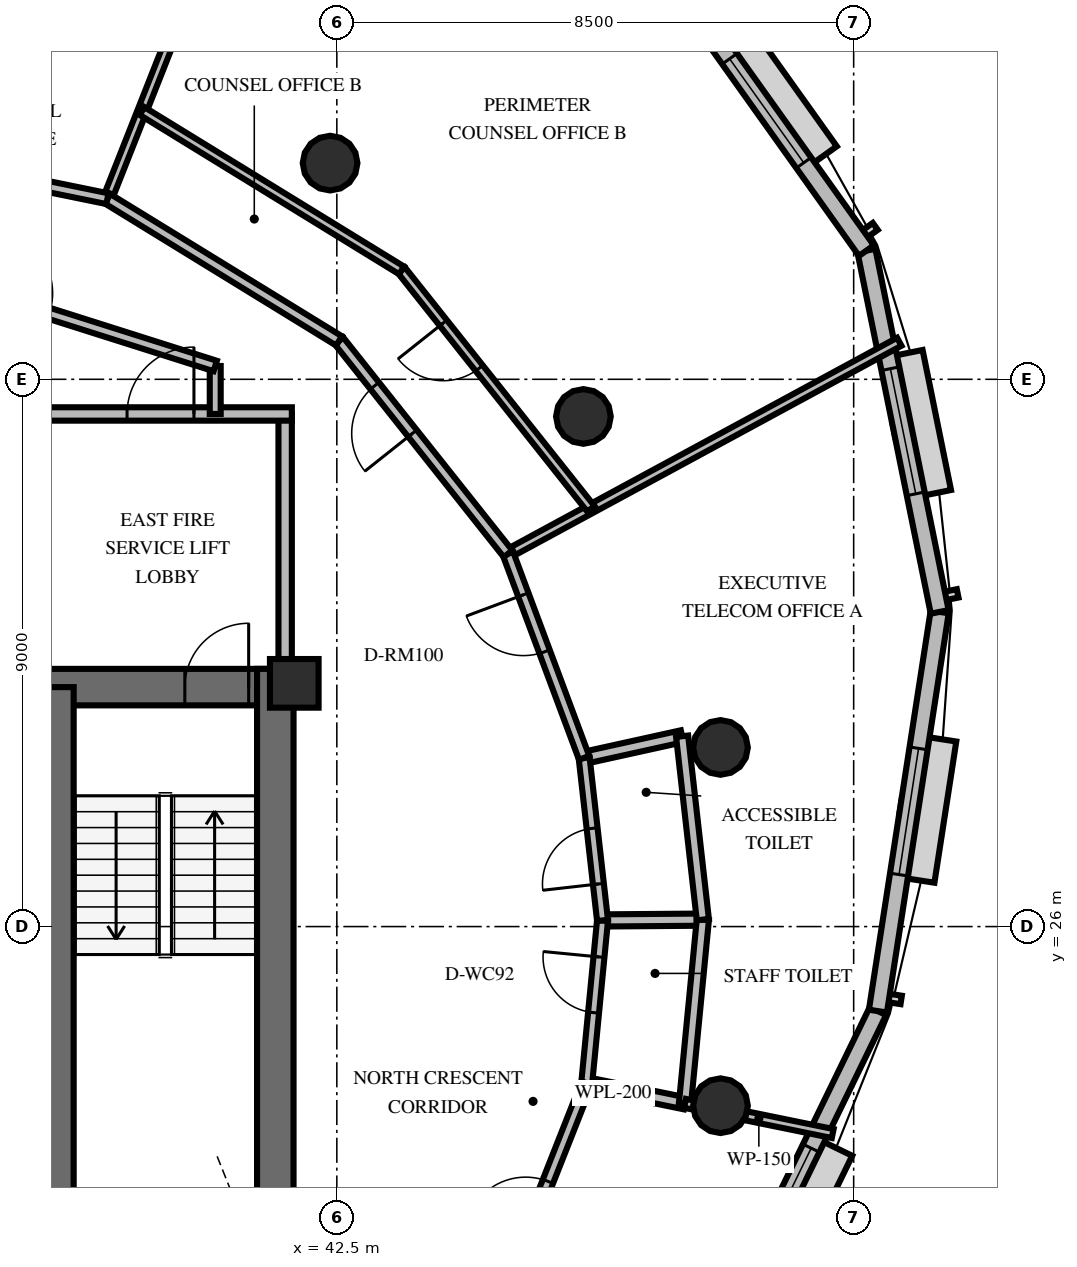
"""IFC4 building model, lengths in metres.
Left out: names, types, materials, properties, quantities, classifications, styles, units other than length and angle.
Written with IfcOpenShell. Run it as: python <this file> out.ifc"""

import sys

from ifc_helpers import new_model, si_unit, direction, frame, frame_2d, origin, origin_2d, place, context, subcontext, project, spatial, rectangle, circle, extrude, element, fill, save


model = new_model("IFC4")
c1 = context("Model", 3, precision=1e-05, world=origin(), true_north=direction((0.0, 1.0)))
c2 = subcontext(c1, "Body", "Model", "MODEL_VIEW")
j1 = project(units=[si_unit("LENGTHUNIT", "METRE"), si_unit("PLANEANGLEUNIT", "RADIAN")], contexts=[c1])
p1 = place(None, origin())
s1 = spatial("IfcSite", under=j1, at=p1, CompositionType="ELEMENT")
p2 = place(p1, origin())
s2 = spatial("IfcBuilding", under=s1, at=p2, CompositionType="ELEMENT")
p3 = place(p2, frame((0.0, 0.0, 234.0)))
s3 = spatial("IfcBuildingStorey", under=s2, at=p3, CompositionType="ELEMENT", Elevation=234.0)
p4 = place(p3, frame((26.222, 29.938, 0.0), z_axis=(0.0, 0.0, 1.0), x_axis=(1.0, 0.0, 0.0)))
e1 = element("IfcWall", 1, at=p4, inside=s3, PredefinedType="SHEAR", context=c2, shape_type="SweptSolid", body=[
    extrude(rectangle(XDim=15.566, YDim=0.6, at=frame_2d((7.783, 0.0))), origin(), (0.0, 0.0, 1.0), 3.6),
])
p5 = place(p4, frame((0.728, 0.0, 0.0)))
e2 = element("IfcOpeningElement", 2, at=p5, cuts=e1, PredefinedType="OPENING", context=c2, shape_type="SweptSolid", body=[
    extrude(rectangle(XDim=1.05, YDim=2.15, at=frame_2d((0.525, 1.075))), frame((0.0, 0.31, 0.0), z_axis=(0.0, -1.0, 0.0), x_axis=(1.0, 0.0, 0.0)), (0.0, 0.0, 1.0), 0.62),
])
p6 = place(p4, frame((13.778, 0.0, 0.0)))
e3 = element("IfcOpeningElement", 3, at=p6, cuts=e1, PredefinedType="OPENING", context=c2, shape_type="SweptSolid", body=[
    extrude(rectangle(XDim=1.05, YDim=2.15, at=frame_2d((0.525, 1.075))), frame((0.0, 0.31, 0.0), z_axis=(0.0, -1.0, 0.0), x_axis=(1.0, 0.0, 0.0)), (0.0, 0.0, 1.0), 0.62),
])
p7 = place(p4, frame((7.228, 0.0, 0.0)))
e4 = element("IfcOpeningElement", 4, at=p7, cuts=e1, PredefinedType="OPENING", context=c2, shape_type="SweptSolid", body=[
    extrude(rectangle(XDim=1.1, YDim=2.15, at=frame_2d((0.55, 1.075))), frame((0.0, 0.31, 0.0), z_axis=(0.0, -1.0, 0.0), x_axis=(1.0, 0.0, 0.0)), (0.0, 0.0, 1.0), 0.62),
])
p8 = place(p3, frame((41.488, 19.962, 0.0), z_axis=(0.0, 0.0, 1.0), x_axis=(0.0, 1.0, 0.0)))
e5 = element("IfcWall", 5, at=p8, inside=s3, PredefinedType="SHEAR", context=c2, shape_type="SweptSolid", body=[
    extrude(rectangle(XDim=10.276, YDim=0.6, at=frame_2d((5.138, 0.0))), origin(), (0.0, 0.0, 1.0), 3.6),
])
p9 = place(p3, frame((37.922, 20.262, 0.0), z_axis=(0.0, 0.0, 1.0), x_axis=(0.0, 1.0, 0.0)))
e6 = element("IfcWall", 6, at=p9, inside=s3, PredefinedType="SHEAR", context=c2, shape_type="SweptSolid", body=[
    extrude(rectangle(XDim=9.676, YDim=0.5, at=frame_2d((4.838, 0.0))), origin(), (0.0, 0.0, 1.0), 3.6),
])
p10 = place(p3, frame((41.8, 30.0, 0.0), z_axis=(0.0, 0.0, 1.0), x_axis=(1.0, 0.0, 0.0)))
e7 = element("IfcColumn", 7, at=p10, inside=s3, PredefinedType="PILASTER", context=c2, shape_type="SweptSolid", body=[
    extrude(rectangle(XDim=0.8, YDim=0.8, at=origin_2d()), origin(), (0.0, 0.0, 1.0), 3.6),
])
for number, where, z_axis, x_axis in (
    (8, (48.81, 28.946, 0.0), (0.0, 0.0, 1.0), (1.0, 0.0, 0.0)),
    (9, (46.555, 34.389, 0.0), (0.0, 0.0, 1.0), (1.0, 0.0, 0.0)),
    (10, (42.389, 38.555, 0.0), (0.0, 0.0, 1.0), (1.0, 0.0, 0.0)),
    (11, (48.81, 23.054, 0.0), (0.0, 0.0, 1.0), (1.0, 0.0, 0.0)),
):
    element("IfcColumn", number, at=place(p3, frame(where, z_axis=z_axis, x_axis=x_axis)), inside=s3, PredefinedType="COLUMN", context=c2, shape_type="SweptSolid", body=[
        extrude(circle(Radius=0.45, at=origin_2d()), origin(), (0.0, 0.0, 1.0), 3.6),
    ])
p11 = place(p3, frame((48.284, 18.213, 0.0), z_axis=(0.0, 0.0, 1.0), x_axis=(0.437731914834, 0.899105539264, 0.0)))
e12 = element("IfcWall", 12, at=p11, inside=s3, PredefinedType="SOLIDWALL", context=c2, shape_type="SweptSolid", body=[
    extrude(rectangle(XDim=7.115, YDim=0.3, at=frame_2d((3.558, 0.0))), origin(), (0.0, 0.0, 1.0), 2.76),
])
p12 = place(p11, frame((2.508, 0.0, 0.8)))
e13 = element("IfcOpeningElement", 13, at=p12, cuts=e12, PredefinedType="OPENING", context=c2, shape_type="SweptSolid", body=[
    extrude(rectangle(XDim=2.1, YDim=1.85, at=frame_2d((1.05, 0.925))), frame((0.0, 0.16, 0.0), z_axis=(0.0, -1.0, 0.0), x_axis=(1.0, 0.0, 0.0)), (0.0, 0.0, 1.0), 0.32),
])
p13 = place(p3, frame((51.399, 24.61, 0.0), z_axis=(0.0, 0.0, 1.0), x_axis=(0.15291596783, 0.988239195126, 0.0)))
e14 = element("IfcWall", 14, at=p13, inside=s3, PredefinedType="SOLIDWALL", context=c2, shape_type="SweptSolid", body=[
    extrude(rectangle(XDim=6.643, YDim=0.3, at=frame_2d((3.322, 0.0))), origin(), (0.0, 0.0, 1.0), 2.76),
])
p14 = place(p13, frame((2.272, 0.0, 0.8)))
e15 = element("IfcOpeningElement", 15, at=p14, cuts=e14, PredefinedType="OPENING", context=c2, shape_type="SweptSolid", body=[
    extrude(rectangle(XDim=2.1, YDim=1.85, at=frame_2d((1.05, 0.925))), frame((0.0, 0.16, 0.0), z_axis=(0.0, -1.0, 0.0), x_axis=(1.0, 0.0, 0.0)), (0.0, 0.0, 1.0), 0.32),
])
p15 = place(p3, frame((52.415, 31.175, 0.0), z_axis=(0.0, 0.0, 1.0), x_axis=(-0.198803056685, 0.980039460763, 0.0)))
e16 = element("IfcWall", 16, at=p15, inside=s3, PredefinedType="SOLIDWALL", context=c2, shape_type="SweptSolid", body=[
    extrude(rectangle(XDim=6.062, YDim=0.3, at=frame_2d((3.031, 0.0))), origin(), (0.0, 0.0, 1.0), 2.76),
])
p16 = place(p15, frame((1.981, 0.0, 0.8)))
e17 = element("IfcOpeningElement", 17, at=p16, cuts=e16, PredefinedType="OPENING", context=c2, shape_type="SweptSolid", body=[
    extrude(rectangle(XDim=2.1, YDim=1.85, at=frame_2d((1.05, 0.925))), frame((0.0, 0.16, 0.0), z_axis=(0.0, -1.0, 0.0), x_axis=(1.0, 0.0, 0.0)), (0.0, 0.0, 1.0), 0.32),
])
p17 = place(p3, frame((51.21, 37.116, 0.0), z_axis=(0.0, 0.0, 1.0), x_axis=(-0.580678098199, 0.814133248475, 0.0)))
e18 = element("IfcWall", 18, at=p17, inside=s3, PredefinedType="SOLIDWALL", context=c2, shape_type="SweptSolid", body=[
    extrude(rectangle(XDim=5.65, YDim=0.3, at=frame_2d((2.825, 0.0))), origin(), (0.0, 0.0, 1.0), 2.76),
])
p18 = place(p17, frame((1.775, 0.0, 0.8)))
e19 = element("IfcOpeningElement", 19, at=p18, cuts=e18, PredefinedType="OPENING", context=c2, shape_type="SweptSolid", body=[
    extrude(rectangle(XDim=2.1, YDim=1.85, at=frame_2d((1.05, 0.925))), frame((0.0, 0.16, 0.0), z_axis=(0.0, -1.0, 0.0), x_axis=(1.0, 0.0, 0.0)), (0.0, 0.0, 1.0), 0.32),
])
p19 = place(p3, frame((41.65, 30.05, 0.0), z_axis=(0.0, 0.0, 1.0), x_axis=(0.0, 1.0, 0.0)))
e20 = element("IfcWall", 20, at=p19, inside=s3, PredefinedType="SOLIDWALL", context=c2, shape_type="SweptSolid", body=[
    extrude(rectangle(XDim=4.38, YDim=0.22, at=frame_2d((2.19, 0.0))), origin(), (0.0, 0.0, 1.0), 2.46),
])
p20 = place(p3, frame((37.45, 34.43, 0.0), z_axis=(0.0, 0.0, 1.0), x_axis=(1.0, 0.0, 0.0)))
e21 = element("IfcWall", 21, at=p20, inside=s3, PredefinedType="SOLIDWALL", context=c2, shape_type="SweptSolid", body=[
    extrude(rectangle(XDim=4.31, YDim=0.22, at=frame_2d((2.155, 0.0))), origin(), (0.0, 0.0, 1.0), 2.46),
])
p21 = place(p20, frame((1.6, 0.0, 0.0)))
e22 = element("IfcOpeningElement", 22, at=p21, cuts=e21, PredefinedType="OPENING", context=c2, shape_type="SweptSolid", body=[
    extrude(rectangle(XDim=1.1, YDim=2.15, at=frame_2d((0.55, 1.075))), frame((0.0, 0.12, 0.0), z_axis=(0.0, -1.0, 0.0), x_axis=(1.0, 0.0, 0.0)), (0.0, 0.0, 1.0), 0.24),
])
p22 = place(p3, frame((40.5, 35.219, 0.0), z_axis=(0.0, 0.0, 1.0), x_axis=(0.0, -1.0, 0.0)))
e23 = element("IfcWall", 23, at=p22, inside=s3, PredefinedType="PARTITIONING", context=c2, shape_type="SweptSolid", body=[
    extrude(rectangle(XDim=0.789, YDim=0.18, at=frame_2d((0.395, 0.0))), origin(), (0.0, 0.0, 1.0), 2.46),
])
p23 = place(p3, frame((34.0, 37.28, 0.0), z_axis=(0.0, 0.0, 1.0), x_axis=(0.953228121756, -0.302251795518, 0.0)))
e24 = element("IfcWall", 24, at=p23, inside=s3, PredefinedType="PARTITIONING", context=c2, shape_type="SweptSolid", body=[
    extrude(rectangle(XDim=6.819, YDim=0.18, at=frame_2d((3.409, 0.0))), origin(), (0.0, 0.0, 1.0), 2.46),
])
p24 = place(p23, frame((2.86, 0.0, 0.0)))
e25 = element("IfcOpeningElement", 25, at=p24, cuts=e24, PredefinedType="OPENING", context=c2, shape_type="SweptSolid", body=[
    extrude(rectangle(XDim=1.1, YDim=2.15, at=frame_2d((0.55, 1.075))), frame((0.0, 0.1, 0.0), z_axis=(0.0, -1.0, 0.0), x_axis=(1.0, 0.0, 0.0)), (0.0, 0.0, 1.0), 0.2),
])
p25 = place(p3, frame((46.609, 23.423, 0.0), z_axis=(0.0, 0.0, 1.0), x_axis=(0.979758481416, -0.200183211319, 0.0)))
e26 = element("IfcWall", 26, at=p25, inside=s3, PredefinedType="PLUMBINGWALL", context=c2, shape_type="SweptSolid", body=[
    extrude(rectangle(XDim=1.65, YDim=0.2, at=frame_2d((0.825, 0.0))), origin(), (0.0, 0.0, 1.0), 2.46),
])
p26 = place(p3, frame((46.87, 26.101, 0.0), z_axis=(0.0, 0.0, 1.0), x_axis=(0.999969248569, 0.0078423158, 0.0)))
e27 = element("IfcWall", 27, at=p26, inside=s3, PredefinedType="PLUMBINGWALL", context=c2, shape_type="SweptSolid", body=[
    extrude(rectangle(XDim=1.65, YDim=0.2, at=frame_2d((0.825, 0.0))), origin(), (0.0, 0.0, 1.0), 2.46),
])
p27 = place(p3, frame((48.226, 23.093, 0.0), z_axis=(0.0, 0.0, 1.0), x_axis=(0.096676337661, 0.995315872342, 0.0)))
e28 = element("IfcWall", 28, at=p27, inside=s3, PredefinedType="PLUMBINGWALL", context=c2, shape_type="SweptSolid", body=[
    extrude(rectangle(XDim=3.035, YDim=0.2, at=frame_2d((1.518, 0.0))), origin(), (0.0, 0.0, 1.0), 2.46),
])
p28 = place(p3, frame((46.609, 23.423, 0.0), z_axis=(0.0, 0.0, 1.0), x_axis=(0.096727271829, 0.995310923724, 0.0)))
e29 = element("IfcWall", 29, at=p28, inside=s3, PredefinedType="PARTITIONING", context=c2, shape_type="SweptSolid", body=[
    extrude(rectangle(XDim=2.691, YDim=0.18, at=frame_2d((1.345, 0.0))), origin(), (0.0, 0.0, 1.0), 2.46),
])
p29 = place(p28, frame((1.167, 0.0, 0.0)))
e30 = element("IfcOpeningElement", 30, at=p29, cuts=e29, PredefinedType="OPENING", context=c2, shape_type="SweptSolid", body=[
    extrude(rectangle(XDim=0.92, YDim=2.1, at=frame_2d((0.46, 1.05))), frame((0.0, 0.1, 0.0), z_axis=(0.0, -1.0, 0.0), x_axis=(1.0, 0.0, 0.0)), (0.0, 0.0, 1.0), 0.2),
])
p30 = place(p3, frame((46.567, 28.775, 0.0), z_axis=(0.0, 0.0, 1.0), x_axis=(0.976488977009, 0.215567339318, 0.0)))
e31 = element("IfcWall", 31, at=p30, inside=s3, PredefinedType="PLUMBINGWALL", context=c2, shape_type="SweptSolid", body=[
    extrude(rectangle(XDim=1.65, YDim=0.2, at=frame_2d((0.825, 0.0))), origin(), (0.0, 0.0, 1.0), 2.46),
])
p31 = place(p3, frame((48.52, 26.114, 0.0), z_axis=(0.0, 0.0, 1.0), x_axis=(-0.112276255415, 0.993677031268, 0.0)))
e32 = element("IfcWall", 32, at=p31, inside=s3, PredefinedType="PLUMBINGWALL", context=c2, shape_type="SweptSolid", body=[
    extrude(rectangle(XDim=3.036, YDim=0.2, at=frame_2d((1.518, 0.0))), origin(), (0.0, 0.0, 1.0), 2.46),
])
p32 = place(p3, frame((46.87, 26.101, 0.0), z_axis=(0.0, 0.0, 1.0), x_axis=(-0.112333499696, 0.993670561527, 0.0)))
e33 = element("IfcWall", 33, at=p32, inside=s3, PredefinedType="PARTITIONING", context=c2, shape_type="SweptSolid", body=[
    extrude(rectangle(XDim=2.691, YDim=0.18, at=frame_2d((1.345, 0.0))), origin(), (0.0, 0.0, 1.0), 2.46),
])
p33 = place(p32, frame((0.603, 0.0, 0.0)))
e34 = element("IfcOpeningElement", 34, at=p33, cuts=e33, PredefinedType="OPENING", context=c2, shape_type="SweptSolid", body=[
    extrude(rectangle(XDim=0.92, YDim=2.1, at=frame_2d((0.46, 1.05))), frame((0.0, 0.1, 0.0), z_axis=(0.0, -1.0, 0.0), x_axis=(1.0, 0.0, 0.0)), (0.0, 0.0, 1.0), 0.2),
])
p34 = place(p3, frame((48.226, 23.093, 0.0), z_axis=(0.0, 0.0, 1.0), x_axis=(0.979742600156, -0.200260923396, 0.0)))
e35 = element("IfcWall", 35, at=p34, inside=s3, PredefinedType="PARTITIONING", context=c2, shape_type="SweptSolid", body=[
    extrude(rectangle(XDim=2.48, YDim=0.15, at=frame_2d((1.24, 0.0))), origin(), (0.0, 0.0, 1.0), 2.46),
])
p35 = place(p3, frame((45.316, 32.131, 0.0), z_axis=(0.0, 0.0, 1.0), x_axis=(0.879230834662, 0.476395990096, 0.0)))
e36 = element("IfcWall", 36, at=p35, inside=s3, PredefinedType="PARTITIONING", context=c2, shape_type="SweptSolid", body=[
    extrude(rectangle(XDim=7.318, YDim=0.15, at=frame_2d((3.659, 0.0))), origin(), (0.0, 0.0, 1.0), 2.46),
])
p36 = place(p3, frame((46.567, 28.775, 0.0), z_axis=(0.0, 0.0, 1.0), x_axis=(-0.349419971737, 0.936966212492, 0.0)))
e37 = element("IfcWall", 37, at=p36, inside=s3, PredefinedType="PARTITIONING", context=c2, shape_type="SweptSolid", body=[
    extrude(rectangle(XDim=3.582, YDim=0.18, at=frame_2d((1.791, 0.0))), origin(), (0.0, 0.0, 1.0), 2.46),
])
p37 = place(p36, frame((1.862, 0.0, 0.0)))
e38 = element("IfcOpeningElement", 38, at=p37, cuts=e37, PredefinedType="OPENING", context=c2, shape_type="SweptSolid", body=[
    extrude(rectangle(XDim=1.0, YDim=2.15, at=frame_2d((0.5, 1.075))), frame((0.0, 0.1, 0.0), z_axis=(0.0, -1.0, 0.0), x_axis=(1.0, 0.0, 0.0)), (0.0, 0.0, 1.0), 0.2),
])
p38 = place(p3, frame((38.727, 37.97, 0.0), z_axis=(0.0, 0.0, 1.0), x_axis=(0.367303252397, 0.93010124222, 0.0)))
e39 = element("IfcWall", 39, at=p38, inside=s3, PredefinedType="PARTITIONING", context=c2, shape_type="SweptSolid", body=[
    extrude(rectangle(XDim=7.318, YDim=0.15, at=frame_2d((3.659, 0.0))), origin(), (0.0, 0.0, 1.0), 2.46),
])
p39 = place(p3, frame((45.316, 32.131, 0.0), z_axis=(0.0, 0.0, 1.0), x_axis=(-0.621813175889, 0.783165611024, 0.0)))
e40 = element("IfcWall", 40, at=p39, inside=s3, PredefinedType="PARTITIONING", context=c2, shape_type="SweptSolid", body=[
    extrude(rectangle(XDim=4.47, YDim=0.18, at=frame_2d((2.235, 0.0))), origin(), (0.0, 0.0, 1.0), 2.46),
])
p40 = place(p39, frame((2.527, 0.0, 0.0)))
e41 = element("IfcOpeningElement", 41, at=p40, cuts=e40, PredefinedType="OPENING", context=c2, shape_type="SweptSolid", body=[
    extrude(rectangle(XDim=1.0, YDim=2.15, at=frame_2d((0.5, 1.075))), frame((0.0, 0.1, 0.0), z_axis=(0.0, -1.0, 0.0), x_axis=(1.0, 0.0, 0.0)), (0.0, 0.0, 1.0), 0.2),
])
p41 = place(p3, frame((42.536, 35.632, 0.0), z_axis=(0.0, 0.0, 1.0), x_axis=(-0.852175498572, 0.523256074626, 0.0)))
e42 = element("IfcWall", 42, at=p41, inside=s3, PredefinedType="PARTITIONING", context=c2, shape_type="SweptSolid", body=[
    extrude(rectangle(XDim=4.47, YDim=0.18, at=frame_2d((2.235, 0.0))), origin(), (0.0, 0.0, 1.0), 2.46),
])
p42 = place(p3, frame((46.678, 32.87, 0.0), z_axis=(0.0, 0.0, 1.0), x_axis=(-0.621831140241, 0.783151347459, 0.0)))
e43 = element("IfcWall", 43, at=p42, inside=s3, PredefinedType="PARTITIONING", context=c2, shape_type="SweptSolid", body=[
    extrude(rectangle(XDim=5.008, YDim=0.15, at=frame_2d((2.504, 0.0))), origin(), (0.0, 0.0, 1.0), 2.46),
])
p43 = place(p42, frame((2.954, 0.0, 0.0)))
e44 = element("IfcOpeningElement", 44, at=p43, cuts=e43, PredefinedType="OPENING", context=c2, shape_type="SweptSolid", body=[
    extrude(rectangle(XDim=0.95, YDim=2.15, at=frame_2d((0.475, 1.075))), frame((0.0, 0.085, 0.0), z_axis=(0.0, -1.0, 0.0), x_axis=(1.0, 0.0, 0.0)), (0.0, 0.0, 1.0), 0.17),
])
p44 = place(p3, frame((43.564, 36.792, 0.0), z_axis=(0.0, 0.0, 1.0), x_axis=(-0.852170081645, 0.523264896538, 0.0)))
e45 = element("IfcWall", 45, at=p44, inside=s3, PredefinedType="PARTITIONING", context=c2, shape_type="SweptSolid", body=[
    extrude(rectangle(XDim=5.008, YDim=0.15, at=frame_2d((2.504, 0.0))), origin(), (0.0, 0.0, 1.0), 2.46),
])
p45 = place(p3, frame((38.727, 37.97, 0.0), z_axis=(0.0, 0.0, 1.0), x_axis=(-0.979757075519, 0.200190092088, 0.0)))
e46 = element("IfcWall", 46, at=p45, inside=s3, PredefinedType="PARTITIONING", context=c2, shape_type="SweptSolid", body=[
    extrude(rectangle(XDim=4.47, YDim=0.18, at=frame_2d((2.235, 0.0))), origin(), (0.0, 0.0, 1.0), 2.46),
])
p46 = place(p3, frame((44.968, 19.266, 0.0), z_axis=(0.0, 0.0, 1.0), x_axis=(0.367328200365, 0.930091389712, 0.0)))
e47 = element("IfcWall", 47, at=p46, inside=s3, PredefinedType="PARTITIONING", context=c2, shape_type="SweptSolid", body=[
    extrude(rectangle(XDim=4.47, YDim=0.18, at=frame_2d((2.235, 0.0))), origin(), (0.0, 0.0, 1.0), 2.46),
])
p47 = place(p46, frame((1.735, 0.0, 0.0)))
e48 = element("IfcOpeningElement", 48, at=p47, cuts=e47, PredefinedType="OPENING", context=c2, shape_type="SweptSolid", body=[
    extrude(rectangle(XDim=1.0, YDim=2.15, at=frame_2d((0.5, 1.075))), frame((0.0, 0.1, 0.0), z_axis=(0.0, -1.0, 0.0), x_axis=(1.0, 0.0, 0.0)), (0.0, 0.0, 1.0), 0.2),
])
p48 = place(p12, origin())
e49 = element("IfcWindow", 49, at=p48, inside=s3, PartitioningType="SINGLE_PANEL", PredefinedType="WINDOW", context=c2, shape_type="SweptSolid", body=[
    extrude(rectangle(XDim=2.1, YDim=1.85, at=frame_2d((1.05, 0.925))), frame((0.0, 0.03, 0.0), z_axis=(0.0, -1.0, 0.0), x_axis=(1.0, 0.0, 0.0)), (0.0, 0.0, 1.0), 0.06),
])
fill(e13, e49)
p49 = place(p14, origin())
e50 = element("IfcWindow", 50, at=p49, inside=s3, PartitioningType="SINGLE_PANEL", PredefinedType="WINDOW", context=c2, shape_type="SweptSolid", body=[
    extrude(rectangle(XDim=2.1, YDim=1.85, at=frame_2d((1.05, 0.925))), frame((0.0, 0.03, 0.0), z_axis=(0.0, -1.0, 0.0), x_axis=(1.0, 0.0, 0.0)), (0.0, 0.0, 1.0), 0.06),
])
fill(e15, e50)
p50 = place(p16, origin())
e51 = element("IfcWindow", 51, at=p50, inside=s3, PartitioningType="SINGLE_PANEL", PredefinedType="WINDOW", context=c2, shape_type="SweptSolid", body=[
    extrude(rectangle(XDim=2.1, YDim=1.85, at=frame_2d((1.05, 0.925))), frame((0.0, 0.03, 0.0), z_axis=(0.0, -1.0, 0.0), x_axis=(1.0, 0.0, 0.0)), (0.0, 0.0, 1.0), 0.06),
])
fill(e17, e51)
p51 = place(p18, origin())
e52 = element("IfcWindow", 52, at=p51, inside=s3, PartitioningType="SINGLE_PANEL", PredefinedType="WINDOW", context=c2, shape_type="SweptSolid", body=[
    extrude(rectangle(XDim=2.1, YDim=1.85, at=frame_2d((1.05, 0.925))), frame((0.0, 0.03, 0.0), z_axis=(0.0, -1.0, 0.0), x_axis=(1.0, 0.0, 0.0)), (0.0, 0.0, 1.0), 0.06),
])
fill(e19, e52)
p52 = place(p6, origin())
e53 = element("IfcDoor", 53, at=p52, inside=s3, OperationType="SINGLE_SWING_RIGHT", PredefinedType="DOOR", context=c2, shape_type="SweptSolid", body=[
    extrude(rectangle(XDim=1.05, YDim=2.15, at=frame_2d((0.525, 1.075))), frame((0.0, 0.025, 0.0), z_axis=(0.0, -1.0, 0.0), x_axis=(1.0, 0.0, 0.0)), (0.0, 0.0, 1.0), 0.05),
])
fill(e3, e53)
p53 = place(p21, origin())
e54 = element("IfcDoor", 54, at=p53, inside=s3, OperationType="SINGLE_SWING_RIGHT", PredefinedType="DOOR", context=c2, shape_type="SweptSolid", body=[
    extrude(rectangle(XDim=1.1, YDim=2.15, at=frame_2d((0.55, 1.075))), frame((0.0, 0.025, 0.0), z_axis=(0.0, -1.0, 0.0), x_axis=(1.0, 0.0, 0.0)), (0.0, 0.0, 1.0), 0.05),
])
fill(e22, e54)
p54 = place(p29, origin())
e55 = element("IfcDoor", 55, at=p54, inside=s3, OperationType="SINGLE_SWING_RIGHT", PredefinedType="DOOR", context=c2, shape_type="SweptSolid", body=[
    extrude(rectangle(XDim=0.92, YDim=2.1, at=frame_2d((0.46, 1.05))), frame((0.0, 0.025, 0.0), z_axis=(0.0, -1.0, 0.0), x_axis=(1.0, 0.0, 0.0)), (0.0, 0.0, 1.0), 0.05),
])
fill(e30, e55)
p55 = place(p33, origin())
e56 = element("IfcDoor", 56, at=p55, inside=s3, OperationType="SINGLE_SWING_LEFT", PredefinedType="DOOR", context=c2, shape_type="SweptSolid", body=[
    extrude(rectangle(XDim=0.92, YDim=2.1, at=frame_2d((0.46, 1.05))), frame((0.0, 0.025, 0.0), z_axis=(0.0, -1.0, 0.0), x_axis=(1.0, 0.0, 0.0)), (0.0, 0.0, 1.0), 0.05),
])
fill(e34, e56)
p56 = place(p37, origin())
e57 = element("IfcDoor", 57, at=p56, inside=s3, OperationType="SINGLE_SWING_RIGHT", PredefinedType="DOOR", context=c2, shape_type="SweptSolid", body=[
    extrude(rectangle(XDim=1.0, YDim=2.15, at=frame_2d((0.5, 1.075))), frame((0.0, 0.025, 0.0), z_axis=(0.0, -1.0, 0.0), x_axis=(1.0, 0.0, 0.0)), (0.0, 0.0, 1.0), 0.05),
])
fill(e38, e57)
p57 = place(p40, origin())
e58 = element("IfcDoor", 58, at=p57, inside=s3, OperationType="SINGLE_SWING_LEFT", PredefinedType="DOOR", context=c2, shape_type="SweptSolid", body=[
    extrude(rectangle(XDim=1.0, YDim=2.15, at=frame_2d((0.5, 1.075))), frame((0.0, 0.025, 0.0), z_axis=(0.0, -1.0, 0.0), x_axis=(1.0, 0.0, 0.0)), (0.0, 0.0, 1.0), 0.05),
])
fill(e41, e58)
p58 = place(p43, origin())
e59 = element("IfcDoor", 59, at=p58, inside=s3, OperationType="SINGLE_SWING_RIGHT", PredefinedType="DOOR", context=c2, shape_type="SweptSolid", body=[
    extrude(rectangle(XDim=0.95, YDim=2.15, at=frame_2d((0.475, 1.075))), frame((0.0, 0.025, 0.0), z_axis=(0.0, -1.0, 0.0), x_axis=(1.0, 0.0, 0.0)), (0.0, 0.0, 1.0), 0.05),
])
fill(e44, e59)
p59 = place(p47, origin())
e60 = element("IfcDoor", 60, at=p59, inside=s3, OperationType="SINGLE_SWING_LEFT", PredefinedType="DOOR", context=c2, shape_type="SweptSolid", body=[
    extrude(rectangle(XDim=1.0, YDim=2.15, at=frame_2d((0.5, 1.075))), frame((0.0, 0.025, 0.0), z_axis=(0.0, -1.0, 0.0), x_axis=(1.0, 0.0, 0.0)), (0.0, 0.0, 1.0), 0.05),
])
fill(e48, e60)
save(model, sys.argv[1])
